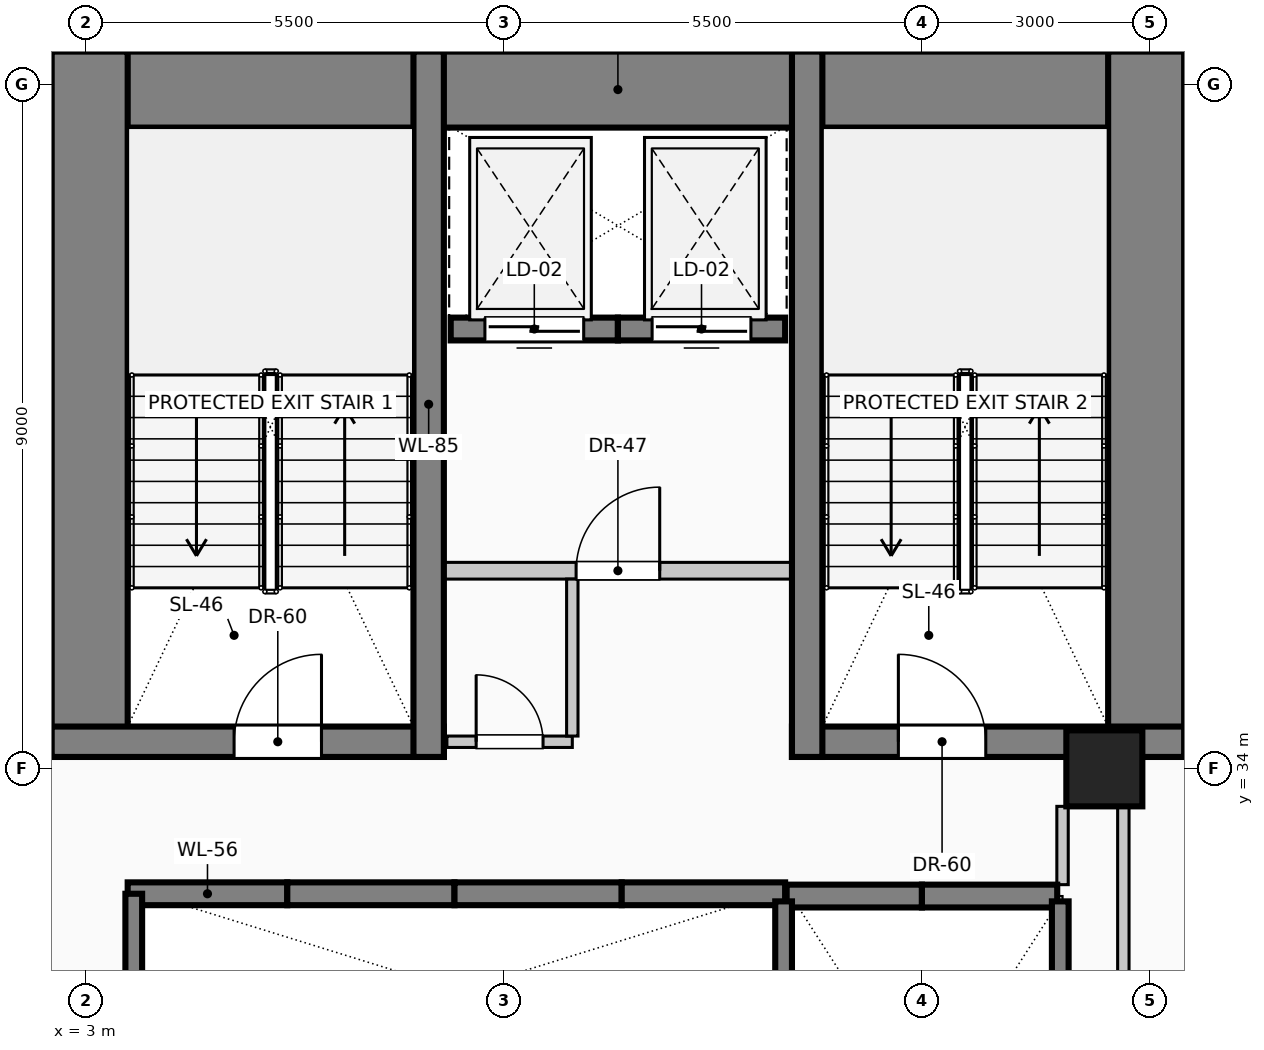
"""IFC4 building model, lengths in metres.
Left out: names, types, materials, properties, quantities, classifications, styles, units other than length and angle.
Written with IfcOpenShell. Run it as: python <this file> out.ifc"""

import sys

from ifc_helpers import new_model, si_unit, direction, frame, frame_2d, origin, origin_2d, place, context, subcontext, project, spatial, rectangle, circle, extrude, element, fill, save


model = new_model("IFC4")
c1 = context("Model", 3, precision=1e-05, world=origin(), true_north=direction((0.0, 1.0)))
c2 = subcontext(c1, "Body", "Model", "MODEL_VIEW")
j1 = project(units=[si_unit("LENGTHUNIT", "METRE"), si_unit("PLANEANGLEUNIT", "RADIAN")], contexts=[c1])
p1 = place(None, origin())
s1 = spatial("IfcSite", under=j1, at=p1, CompositionType="ELEMENT")
p2 = place(p1, origin())
s2 = spatial("IfcBuilding", under=s1, at=p2, CompositionType="ELEMENT")
p3 = place(p2, frame((0.0, 0.0, 78.6)))
s3 = spatial("IfcBuildingStorey", under=s2, at=p3, CompositionType="ELEMENT", Elevation=78.6)
p4 = place(p3, frame((2.55, 42.93, 0.0), z_axis=(0.0, 0.0, 1.0), x_axis=(1.0, 0.0, 0.0)))
e1 = element("IfcWall", 1, at=p4, inside=s3, PredefinedType="SHEAR", context=c2, shape_type="SweptSolid", body=[
    extrude(rectangle(XDim=14.9, YDim=1.0, at=frame_2d((7.45, 0.0))), origin(), (0.0, 0.0, 1.0), 4.0),
])
for number, where, z_axis, x_axis in (
    (2, (3.05, 34.15, 0.0), (0.0, 0.0, 1.0), (0.0, 1.0, 0.0)),
    (3, (16.95, 34.15, 0.0), (0.0, 0.0, 1.0), (0.0, 1.0, 0.0)),
):
    element("IfcWall", number, at=place(p3, frame(where, z_axis=z_axis, x_axis=x_axis)), inside=s3, PredefinedType="SHEAR", context=c2, shape_type="SweptSolid", body=[
        extrude(rectangle(XDim=9.28, YDim=1.0, at=frame_2d((4.64, 0.0))), origin(), (0.0, 0.0, 1.0), 4.0),
    ])
p5 = place(p3, frame((2.55, 34.35, 0.0), z_axis=(0.0, 0.0, 1.0), x_axis=(1.0, 0.0, 0.0)))
e4 = element("IfcWall", 4, at=p5, inside=s3, PredefinedType="SHEAR", context=c2, shape_type="SweptSolid", body=[
    extrude(rectangle(XDim=5.16, YDim=0.4, at=frame_2d((2.58, 0.0))), origin(), (0.0, 0.0, 1.0), 4.0),
])
p6 = place(p5, frame((2.4, 0.0, 0.0)))
e5 = element("IfcOpeningElement", 5, at=p6, cuts=e4, PredefinedType="OPENING", context=c2, shape_type="SweptSolid", body=[
    extrude(rectangle(XDim=1.15, YDim=2.2, at=frame_2d((0.575, 1.1))), frame((0.0, 0.21, 0.0), z_axis=(0.0, -1.0, 0.0), x_axis=(1.0, 0.0, 0.0)), (0.0, 0.0, 1.0), 0.42),
])
p7 = place(p3, frame((12.29, 34.35, 0.0), z_axis=(0.0, 0.0, 1.0), x_axis=(1.0, 0.0, 0.0)))
e6 = element("IfcWall", 6, at=p7, inside=s3, PredefinedType="SHEAR", context=c2, shape_type="SweptSolid", body=[
    extrude(rectangle(XDim=5.16, YDim=0.4, at=frame_2d((2.58, 0.0))), origin(), (0.0, 0.0, 1.0), 4.0),
])
p8 = place(p7, frame((1.4, 0.0, 0.0)))
e7 = element("IfcOpeningElement", 7, at=p8, cuts=e6, PredefinedType="OPENING", context=c2, shape_type="SweptSolid", body=[
    extrude(rectangle(XDim=1.15, YDim=2.2, at=frame_2d((0.575, 1.1))), frame((0.0, 0.21, 0.0), z_axis=(0.0, -1.0, 0.0), x_axis=(1.0, 0.0, 0.0)), (0.0, 0.0, 1.0), 0.42),
])
for number, where, z_axis, x_axis in (
    (8, (7.51, 34.15, 0.0), (0.0, 0.0, 1.0), (0.0, 1.0, 0.0)),
    (9, (12.49, 34.15, 0.0), (0.0, 0.0, 1.0), (0.0, 1.0, 0.0)),
):
    element("IfcWall", number, at=place(p3, frame(where, z_axis=z_axis, x_axis=x_axis)), inside=s3, PredefinedType="SHEAR", context=c2, shape_type="SweptSolid", body=[
        extrude(rectangle(XDim=9.28, YDim=0.4, at=frame_2d((4.64, 0.0))), origin(), (0.0, 0.0, 1.0), 4.0),
    ])
p9 = place(p3, frame((16.4, 34.0, 0.0), z_axis=(0.0, 0.0, 1.0), x_axis=(1.0, 0.0, 0.0)))
e10 = element("IfcColumn", 10, at=p9, inside=s3, PredefinedType="COLUMN", context=c2, shape_type="SweptSolid", body=[
    extrude(circle(Radius=0.5, at=origin_2d()), origin(), (0.0, 0.0, 1.0), 4.0),
])
for number, where, z_axis, x_axis in (
    (11, (12.22, 32.32, 0.0), (0.0, 0.0, 1.0), (1.0, 0.0, 0.0)),
    (12, (14.0, 32.32, 0.0), (0.0, 0.0, 1.0), (1.0, 0.0, 0.0)),
):
    element("IfcWall", number, at=place(p3, frame(where, z_axis=z_axis, x_axis=x_axis)), inside=s3, PredefinedType="SOLIDWALL", context=c2, shape_type="SweptSolid", body=[
        extrude(rectangle(XDim=1.78, YDim=0.3, at=frame_2d((0.89, 0.0))), origin(), (0.0, 0.0, 1.0), 4.0),
    ])
p10 = place(p3, frame((3.55, 32.35, 0.0), z_axis=(0.0, 0.0, 1.0), x_axis=(1.0, 0.0, 0.0)))
e13 = element("IfcWall", 13, at=p10, inside=s3, PredefinedType="SOLIDWALL", context=c2, shape_type="SweptSolid", body=[
    extrude(rectangle(XDim=2.1, YDim=0.3, at=frame_2d((1.05, 0.0))), origin(), (0.0, 0.0, 1.0), 4.0),
])
p11 = place(p3, frame((5.65, 32.35, 0.0), z_axis=(0.0, 0.0, 1.0), x_axis=(1.0, 0.0, 0.0)))
e14 = element("IfcWall", 14, at=p11, inside=s3, PredefinedType="SOLIDWALL", context=c2, shape_type="SweptSolid", body=[
    extrude(rectangle(XDim=2.2, YDim=0.3, at=frame_2d((1.1, 0.0))), origin(), (0.0, 0.0, 1.0), 4.0),
])
p12 = place(p3, frame((7.85, 32.35, 0.0), z_axis=(0.0, 0.0, 1.0), x_axis=(1.0, 0.0, 0.0)))
e15 = element("IfcWall", 15, at=p12, inside=s3, PredefinedType="SOLIDWALL", context=c2, shape_type="SweptSolid", body=[
    extrude(rectangle(XDim=2.2, YDim=0.3, at=frame_2d((1.1, 0.0))), origin(), (0.0, 0.0, 1.0), 4.0),
])
p13 = place(p3, frame((10.05, 32.35, 0.0), z_axis=(0.0, 0.0, 1.0), x_axis=(1.0, 0.0, 0.0)))
e16 = element("IfcWall", 16, at=p13, inside=s3, PredefinedType="SOLIDWALL", context=c2, shape_type="SweptSolid", body=[
    extrude(rectangle(XDim=2.15, YDim=0.3, at=frame_2d((1.075, 0.0))), origin(), (0.0, 0.0, 1.0), 4.0),
])
p14 = place(p3, frame((10.0, 39.78, 0.0), z_axis=(0.0, 0.0, 1.0), x_axis=(-1.0, 0.0, 0.0)))
e17 = element("IfcWall", 17, at=p14, inside=s3, PredefinedType="SOLIDWALL", context=c2, shape_type="SweptSolid", body=[
    extrude(rectangle(XDim=2.2, YDim=0.3, at=frame_2d((1.1, 0.0))), origin(), (0.0, 0.0, 1.0), 4.0),
])
p15 = place(p14, frame((0.45, 0.0, 0.0)))
e18 = element("IfcOpeningElement", 18, at=p15, cuts=e17, PredefinedType="OPENING", context=c2, shape_type="SweptSolid", body=[
    extrude(rectangle(XDim=1.3, YDim=2.25, at=frame_2d((0.65, 1.125))), frame((0.0, 0.16, 0.0), z_axis=(0.0, -1.0, 0.0), x_axis=(1.0, 0.0, 0.0)), (0.0, 0.0, 1.0), 0.32),
])
p16 = place(p3, frame((12.2, 39.78, 0.0), z_axis=(0.0, 0.0, 1.0), x_axis=(-1.0, 0.0, 0.0)))
e19 = element("IfcWall", 19, at=p16, inside=s3, PredefinedType="SOLIDWALL", context=c2, shape_type="SweptSolid", body=[
    extrude(rectangle(XDim=2.2, YDim=0.3, at=frame_2d((1.1, 0.0))), origin(), (0.0, 0.0, 1.0), 4.0),
])
p17 = place(p16, frame((0.45, 0.0, 0.0)))
e20 = element("IfcOpeningElement", 20, at=p17, cuts=e19, PredefinedType="OPENING", context=c2, shape_type="SweptSolid", body=[
    extrude(rectangle(XDim=1.3, YDim=2.25, at=frame_2d((0.65, 1.125))), frame((0.0, 0.16, 0.0), z_axis=(0.0, -1.0, 0.0), x_axis=(1.0, 0.0, 0.0)), (0.0, 0.0, 1.0), 0.32),
])
p18 = place(p3, frame((3.63, 26.8, 0.0), z_axis=(0.0, 0.0, 1.0), x_axis=(0.0, 1.0, 0.0)))
e21 = element("IfcWall", 21, at=p18, inside=s3, PredefinedType="SOLIDWALL", context=c2, shape_type="SweptSolid", body=[
    extrude(rectangle(XDim=5.55, YDim=0.22, at=frame_2d((2.775, 0.0))), origin(), (0.0, 0.0, 1.0), 4.0),
])
for number, where, z_axis, x_axis in (
    (22, (12.18, 26.8, 0.0), (0.0, 0.0, 1.0), (0.0, 1.0, 0.0)),
    (23, (15.82, 26.8, 0.0), (0.0, 0.0, 1.0), (0.0, 1.0, 0.0)),
):
    element("IfcWall", number, at=place(p3, frame(where, z_axis=z_axis, x_axis=x_axis)), inside=s3, PredefinedType="SOLIDWALL", context=c2, shape_type="SweptSolid", body=[
        extrude(rectangle(XDim=5.45, YDim=0.22, at=frame_2d((2.725, 0.0))), origin(), (0.0, 0.0, 1.0), 4.0),
    ])
p19 = place(p3, frame((7.51, 36.6, 0.0), z_axis=(0.0, 0.0, 1.0), x_axis=(1.0, 0.0, 0.0)))
e24 = element("IfcWall", 24, at=p19, inside=s3, PredefinedType="PARTITIONING", context=c2, shape_type="SweptSolid", body=[
    extrude(rectangle(XDim=4.98, YDim=0.22, at=frame_2d((2.49, 0.0))), origin(), (0.0, 0.0, 1.0), 3.66),
])
p20 = place(p19, frame((1.94, 0.0, 0.0)))
e25 = element("IfcOpeningElement", 25, at=p20, cuts=e24, PredefinedType="OPENING", context=c2, shape_type="SweptSolid", body=[
    extrude(rectangle(XDim=1.1, YDim=2.2, at=frame_2d((0.55, 1.1))), frame((0.0, 0.12, 0.0), z_axis=(0.0, -1.0, 0.0), x_axis=(1.0, 0.0, 0.0)), (0.0, 0.0, 1.0), 0.24),
])
p21 = place(p3, frame((7.75, 34.35, 0.0), z_axis=(0.0, 0.0, 1.0), x_axis=(1.0, 0.0, 0.0)))
e26 = element("IfcWall", 26, at=p21, inside=s3, PredefinedType="PARTITIONING", context=c2, shape_type="SweptSolid", body=[
    extrude(rectangle(XDim=1.65, YDim=0.15, at=frame_2d((0.825, 0.0))), origin(), (0.0, 0.0, 1.0), 3.66),
])
p22 = place(p21, frame((0.385, 0.0, 0.0)))
e27 = element("IfcOpeningElement", 27, at=p22, cuts=e26, PredefinedType="OPENING", context=c2, shape_type="SweptSolid", body=[
    extrude(rectangle(XDim=0.88, YDim=2.1, at=frame_2d((0.44, 1.05))), frame((0.0, 0.085, 0.0), z_axis=(0.0, -1.0, 0.0), x_axis=(1.0, 0.0, 0.0)), (0.0, 0.0, 1.0), 0.17),
])
p23 = place(p3, frame((9.4, 34.425, 0.0), z_axis=(0.0, 0.0, 1.0), x_axis=(0.0, 1.0, 0.0)))
e28 = element("IfcWall", 28, at=p23, inside=s3, PredefinedType="PARTITIONING", context=c2, shape_type="SweptSolid", body=[
    extrude(rectangle(XDim=2.065, YDim=0.15, at=frame_2d((1.032, 0.0))), origin(), (0.0, 0.0, 1.0), 3.66),
])
p24 = place(p3, frame((15.85, 32.47, 0.0), z_axis=(0.0, 0.0, 1.0), x_axis=(0.0, 1.0, 0.0)))
e29 = element("IfcWall", 29, at=p24, inside=s3, PredefinedType="PARTITIONING", context=c2, shape_type="SweptSolid", body=[
    extrude(rectangle(XDim=1.03, YDim=0.15, at=frame_2d((0.515, 0.0))), origin(), (0.0, 0.0, 1.0), 3.66),
])
p25 = place(p3, frame((16.65, 23.475, 0.0), z_axis=(0.0, 0.0, 1.0), x_axis=(0.0, 1.0, 0.0)))
e30 = element("IfcWall", 30, at=p25, inside=s3, PredefinedType="PARTITIONING", context=c2, shape_type="SweptSolid", body=[
    extrude(rectangle(XDim=10.025, YDim=0.15, at=frame_2d((5.012, 0.0))), origin(), (0.0, 0.0, 1.0), 2.955),
])
p26 = place(p15, origin())
e31 = element("IfcDoor", 31, at=p26, inside=s3, OperationType="SLIDING_TO_LEFT", PredefinedType="DOOR", context=c2, shape_type="SweptSolid", body=[
    extrude(rectangle(XDim=1.3, YDim=2.25, at=frame_2d((0.65, 1.125))), frame((0.0, 0.025, 0.0), z_axis=(0.0, -1.0, 0.0), x_axis=(1.0, 0.0, 0.0)), (0.0, 0.0, 1.0), 0.05),
])
fill(e18, e31)
p27 = place(p17, origin())
e32 = element("IfcDoor", 32, at=p27, inside=s3, OperationType="SLIDING_TO_RIGHT", PredefinedType="DOOR", context=c2, shape_type="SweptSolid", body=[
    extrude(rectangle(XDim=1.3, YDim=2.25, at=frame_2d((0.65, 1.125))), frame((0.0, 0.025, 0.0), z_axis=(0.0, -1.0, 0.0), x_axis=(1.0, 0.0, 0.0)), (0.0, 0.0, 1.0), 0.05),
])
fill(e20, e32)
p28 = place(p6, origin())
e33 = element("IfcDoor", 33, at=p28, inside=s3, OperationType="SINGLE_SWING_RIGHT", PredefinedType="DOOR", context=c2, shape_type="SweptSolid", body=[
    extrude(rectangle(XDim=1.15, YDim=2.2, at=frame_2d((0.575, 1.1))), frame((0.0, 0.025, 0.0), z_axis=(0.0, -1.0, 0.0), x_axis=(1.0, 0.0, 0.0)), (0.0, 0.0, 1.0), 0.05),
])
fill(e5, e33)
p29 = place(p8, origin())
e34 = element("IfcDoor", 34, at=p29, inside=s3, OperationType="SINGLE_SWING_LEFT", PredefinedType="DOOR", context=c2, shape_type="SweptSolid", body=[
    extrude(rectangle(XDim=1.15, YDim=2.2, at=frame_2d((0.575, 1.1))), frame((0.0, 0.025, 0.0), z_axis=(0.0, -1.0, 0.0), x_axis=(1.0, 0.0, 0.0)), (0.0, 0.0, 1.0), 0.05),
])
fill(e7, e34)
p30 = place(p20, origin())
e35 = element("IfcDoor", 35, at=p30, inside=s3, OperationType="SINGLE_SWING_RIGHT", PredefinedType="DOOR", context=c2, shape_type="SweptSolid", body=[
    extrude(rectangle(XDim=1.1, YDim=2.2, at=frame_2d((0.55, 1.1))), frame((0.0, 0.025, 0.0), z_axis=(0.0, -1.0, 0.0), x_axis=(1.0, 0.0, 0.0)), (0.0, 0.0, 1.0), 0.05),
])
fill(e25, e35)
p31 = place(p22, origin())
e36 = element("IfcDoor", 36, at=p31, inside=s3, OperationType="SINGLE_SWING_LEFT", PredefinedType="DOOR", context=c2, shape_type="SweptSolid", body=[
    extrude(rectangle(XDim=0.88, YDim=2.1, at=frame_2d((0.44, 1.05))), frame((0.0, 0.025, 0.0), z_axis=(0.0, -1.0, 0.0), x_axis=(1.0, 0.0, 0.0)), (0.0, 0.0, 1.0), 0.05),
])
fill(e27, e36)
save(model, sys.argv[1])
